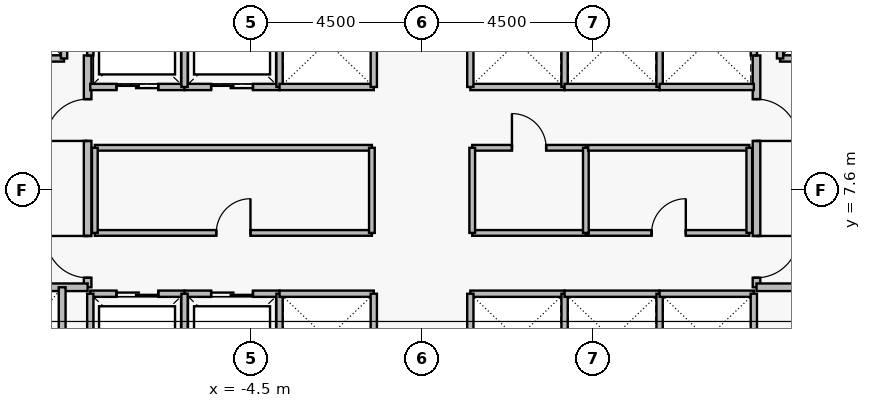
"""IFC4 building model, lengths in metres.
Left out: names, types, materials, properties, quantities, classifications, styles, units other than length and angle.
Written with IfcOpenShell. Run it as: python <this file> out.ifc"""

import sys

from ifc_helpers import new_model, si_unit, direction, frame, frame_2d, origin, place, context, subcontext, project, spatial, rectangle, extrude, element, fill, save


model = new_model("IFC4")
c1 = context("Model", 3, precision=1e-05, world=origin(), true_north=direction((0.0, 1.0)))
c2 = subcontext(c1, "Body", "Model", "MODEL_VIEW")
j1 = project(units=[si_unit("LENGTHUNIT", "METRE"), si_unit("PLANEANGLEUNIT", "RADIAN")], contexts=[c1])
p1 = place(None, origin())
s1 = spatial("IfcSite", under=j1, at=p1, CompositionType="ELEMENT")
p2 = place(p1, origin())
s2 = spatial("IfcBuilding", under=s1, at=p2, CompositionType="ELEMENT")
p3 = place(p2, frame((0.0, 0.0, 150.4)))
s3 = spatial("IfcBuildingStorey", under=s2, at=p3, CompositionType="ELEMENT", Elevation=150.4)
p4 = place(p3, frame((-8.8, 5.05, 0.0), z_axis=(0.0, 0.0, 1.0), x_axis=(0.0, 1.0, 0.0)))
e1 = element("IfcWall", 1, at=p4, inside=s3, PredefinedType="PARTITIONING", context=c2, shape_type="SweptSolid", body=[
    extrude(rectangle(XDim=6.1, YDim=0.2, at=frame_2d((3.05, 0.0))), origin(), (0.0, 0.0, 1.0), 3.43),
])
p5 = place(p4, frame((0.25, 0.0, 0.0)))
e2 = element("IfcOpeningElement", 2, at=p5, cuts=e1, PredefinedType="OPENING", context=c2, shape_type="SweptSolid", body=[
    extrude(rectangle(XDim=1.1, YDim=2.2, at=frame_2d((0.55, 1.1))), frame((0.0, 0.11, 0.0), z_axis=(0.0, -1.0, 0.0), x_axis=(1.0, 0.0, 0.0)), (0.0, 0.0, 1.0), 0.22),
])
p6 = place(p4, frame((3.85, 0.0, 0.0)))
e3 = element("IfcOpeningElement", 3, at=p6, cuts=e1, PredefinedType="OPENING", context=c2, shape_type="SweptSolid", body=[
    extrude(rectangle(XDim=1.1, YDim=2.2, at=frame_2d((0.55, 1.1))), frame((0.0, 0.11, 0.0), z_axis=(0.0, -1.0, 0.0), x_axis=(1.0, 0.0, 0.0)), (0.0, 0.0, 1.0), 0.22),
])
p7 = place(p3, frame((8.8, 11.15, 0.0), z_axis=(0.0, 0.0, 1.0), x_axis=(0.0, -1.0, 0.0)))
e4 = element("IfcWall", 4, at=p7, inside=s3, PredefinedType="PARTITIONING", context=c2, shape_type="SweptSolid", body=[
    extrude(rectangle(XDim=6.1, YDim=0.2, at=frame_2d((3.05, 0.0))), origin(), (0.0, 0.0, 1.0), 3.43),
])
p8 = place(p7, frame((1.15, 0.0, 0.0)))
e5 = element("IfcOpeningElement", 5, at=p8, cuts=e4, PredefinedType="OPENING", context=c2, shape_type="SweptSolid", body=[
    extrude(rectangle(XDim=1.1, YDim=2.2, at=frame_2d((0.55, 1.1))), frame((0.0, 0.11, 0.0), z_axis=(0.0, -1.0, 0.0), x_axis=(1.0, 0.0, 0.0)), (0.0, 0.0, 1.0), 0.22),
])
p9 = place(p7, frame((4.75, 0.0, 0.0)))
e6 = element("IfcOpeningElement", 6, at=p9, cuts=e4, PredefinedType="OPENING", context=c2, shape_type="SweptSolid", body=[
    extrude(rectangle(XDim=1.1, YDim=2.2, at=frame_2d((0.55, 1.1))), frame((0.0, 0.11, 0.0), z_axis=(0.0, -1.0, 0.0), x_axis=(1.0, 0.0, 0.0)), (0.0, 0.0, 1.0), 0.22),
])
p10 = place(p3, frame((-11.58, 11.07, 0.0), z_axis=(0.0, 0.0, 1.0), x_axis=(1.0, 0.0, 0.0)))
e7 = element("IfcWall", 7, at=p10, inside=s3, PredefinedType="PARTITIONING", context=c2, shape_type="SweptSolid", body=[
    extrude(rectangle(XDim=2.16, YDim=0.165, at=frame_2d((1.08, 0.0))), origin(), (0.0, 0.0, 1.0), 3.43),
])
p11 = place(p10, frame((0.53, 0.0, 0.0)))
e8 = element("IfcOpeningElement", 8, at=p11, cuts=e7, PredefinedType="OPENING", context=c2, shape_type="SweptSolid", body=[
    extrude(rectangle(XDim=1.15, YDim=2.25, at=frame_2d((0.575, 1.125))), frame((0.0, 0.093, 0.0), z_axis=(0.0, -1.0, 0.0), x_axis=(1.0, 0.0, 0.0)), (0.0, 0.0, 1.0), 0.185),
])
p12 = place(p3, frame((9.42, 11.07, 0.0), z_axis=(0.0, 0.0, 1.0), x_axis=(1.0, 0.0, 0.0)))
e9 = element("IfcWall", 9, at=p12, inside=s3, PredefinedType="PARTITIONING", context=c2, shape_type="SweptSolid", body=[
    extrude(rectangle(XDim=2.16, YDim=0.165, at=frame_2d((1.08, 0.0))), origin(), (0.0, 0.0, 1.0), 3.43),
])
p13 = place(p12, frame((0.53, 0.0, 0.0)))
e10 = element("IfcOpeningElement", 10, at=p13, cuts=e9, PredefinedType="OPENING", context=c2, shape_type="SweptSolid", body=[
    extrude(rectangle(XDim=1.15, YDim=2.25, at=frame_2d((0.575, 1.125))), frame((0.0, 0.093, 0.0), z_axis=(0.0, -1.0, 0.0), x_axis=(1.0, 0.0, 0.0)), (0.0, 0.0, 1.0), 0.185),
])
p14 = place(p3, frame((-8.73, 4.88, 0.0), z_axis=(0.0, 0.0, 1.0), x_axis=(1.0, 0.0, 0.0)))
e11 = element("IfcWall", 11, at=p14, inside=s3, PredefinedType="PARTITIONING", context=c2, shape_type="SweptSolid", body=[
    extrude(rectangle(XDim=2.48, YDim=0.165, at=frame_2d((1.24, 0.0))), origin(), (0.0, 0.0, 1.0), 3.43),
])
p15 = place(p14, frame((0.69, 0.0, 0.0)))
e12 = element("IfcOpeningElement", 12, at=p15, cuts=e11, PredefinedType="OPENING", context=c2, shape_type="SweptSolid", body=[
    extrude(rectangle(XDim=1.1, YDim=2.25, at=frame_2d((0.55, 1.125))), frame((0.0, 0.093, 0.0), z_axis=(0.0, -1.0, 0.0), x_axis=(1.0, 0.0, 0.0)), (0.0, 0.0, 1.0), 0.185),
])
p16 = place(p3, frame((-6.25, 4.88, 0.0), z_axis=(0.0, 0.0, 1.0), x_axis=(1.0, 0.0, 0.0)))
e13 = element("IfcWall", 13, at=p16, inside=s3, PredefinedType="PARTITIONING", context=c2, shape_type="SweptSolid", body=[
    extrude(rectangle(XDim=2.5, YDim=0.165, at=frame_2d((1.25, 0.0))), origin(), (0.0, 0.0, 1.0), 3.43),
])
p17 = place(p16, frame((0.7, 0.0, 0.0)))
e14 = element("IfcOpeningElement", 14, at=p17, cuts=e13, PredefinedType="OPENING", context=c2, shape_type="SweptSolid", body=[
    extrude(rectangle(XDim=1.1, YDim=2.25, at=frame_2d((0.55, 1.125))), frame((0.0, 0.093, 0.0), z_axis=(0.0, -1.0, 0.0), x_axis=(1.0, 0.0, 0.0)), (0.0, 0.0, 1.0), 0.185),
])
p18 = place(p3, frame((-8.73, 10.32, 0.0), z_axis=(0.0, 0.0, 1.0), x_axis=(1.0, 0.0, 0.0)))
e15 = element("IfcWall", 15, at=p18, inside=s3, PredefinedType="PARTITIONING", context=c2, shape_type="SweptSolid", body=[
    extrude(rectangle(XDim=2.48, YDim=0.165, at=frame_2d((1.24, 0.0))), origin(), (0.0, 0.0, 1.0), 3.43),
])
p19 = place(p18, frame((0.69, 0.0, 0.0)))
e16 = element("IfcOpeningElement", 16, at=p19, cuts=e15, PredefinedType="OPENING", context=c2, shape_type="SweptSolid", body=[
    extrude(rectangle(XDim=1.1, YDim=2.25, at=frame_2d((0.55, 1.125))), frame((0.0, 0.093, 0.0), z_axis=(0.0, -1.0, 0.0), x_axis=(1.0, 0.0, 0.0)), (0.0, 0.0, 1.0), 0.185),
])
p20 = place(p3, frame((-6.25, 10.32, 0.0), z_axis=(0.0, 0.0, 1.0), x_axis=(1.0, 0.0, 0.0)))
e17 = element("IfcWall", 17, at=p20, inside=s3, PredefinedType="PARTITIONING", context=c2, shape_type="SweptSolid", body=[
    extrude(rectangle(XDim=2.5, YDim=0.165, at=frame_2d((1.25, 0.0))), origin(), (0.0, 0.0, 1.0), 3.43),
])
p21 = place(p20, frame((0.7, 0.0, 0.0)))
e18 = element("IfcOpeningElement", 18, at=p21, cuts=e17, PredefinedType="OPENING", context=c2, shape_type="SweptSolid", body=[
    extrude(rectangle(XDim=1.1, YDim=2.25, at=frame_2d((0.55, 1.125))), frame((0.0, 0.093, 0.0), z_axis=(0.0, -1.0, 0.0), x_axis=(1.0, 0.0, 0.0)), (0.0, 0.0, 1.0), 0.185),
])
p22 = place(p3, frame((-8.61, 6.48, 0.0), z_axis=(0.0, 0.0, 1.0), x_axis=(1.0, 0.0, 0.0)))
e19 = element("IfcWall", 19, at=p22, inside=s3, PredefinedType="PARTITIONING", context=c2, shape_type="SweptSolid", body=[
    extrude(rectangle(XDim=7.29, YDim=0.15, at=frame_2d((3.645, 0.0))), origin(), (0.0, 0.0, 1.0), 3.43),
])
p23 = place(p22, frame((3.195, 0.0, 0.0)))
e20 = element("IfcOpeningElement", 20, at=p23, cuts=e19, PredefinedType="OPENING", context=c2, shape_type="SweptSolid", body=[
    extrude(rectangle(XDim=0.9, YDim=2.15, at=frame_2d((0.45, 1.075))), frame((0.0, 0.085, 0.0), z_axis=(0.0, -1.0, 0.0), x_axis=(1.0, 0.0, 0.0)), (0.0, 0.0, 1.0), 0.17),
])
p24 = place(p3, frame((1.32, 8.72, 0.0), z_axis=(0.0, 0.0, 1.0), x_axis=(1.0, 0.0, 0.0)))
e21 = element("IfcWall", 21, at=p24, inside=s3, PredefinedType="PARTITIONING", context=c2, shape_type="SweptSolid", body=[
    extrude(rectangle(XDim=2.99, YDim=0.15, at=frame_2d((1.495, 0.0))), origin(), (0.0, 0.0, 1.0), 3.43),
])
p25 = place(p24, frame((1.045, 0.0, 0.0)))
e22 = element("IfcOpeningElement", 22, at=p25, cuts=e21, PredefinedType="OPENING", context=c2, shape_type="SweptSolid", body=[
    extrude(rectangle(XDim=0.9, YDim=2.15, at=frame_2d((0.45, 1.075))), frame((0.0, 0.085, 0.0), z_axis=(0.0, -1.0, 0.0), x_axis=(1.0, 0.0, 0.0)), (0.0, 0.0, 1.0), 0.17),
])
p26 = place(p3, frame((4.37, 6.48, 0.0), z_axis=(0.0, 0.0, 1.0), x_axis=(1.0, 0.0, 0.0)))
e23 = element("IfcWall", 23, at=p26, inside=s3, PredefinedType="PARTITIONING", context=c2, shape_type="SweptSolid", body=[
    extrude(rectangle(XDim=4.24, YDim=0.15, at=frame_2d((2.12, 0.0))), origin(), (0.0, 0.0, 1.0), 3.43),
])
p27 = place(p26, frame((1.67, 0.0, 0.0)))
e24 = element("IfcOpeningElement", 24, at=p27, cuts=e23, PredefinedType="OPENING", context=c2, shape_type="SweptSolid", body=[
    extrude(rectangle(XDim=0.9, YDim=2.15, at=frame_2d((0.45, 1.075))), frame((0.0, 0.085, 0.0), z_axis=(0.0, -1.0, 0.0), x_axis=(1.0, 0.0, 0.0)), (0.0, 0.0, 1.0), 0.17),
])
for number, where, z_axis, x_axis in (
    (25, (-11.65, 5.05, 0.0), (0.0, 0.0, 1.0), (1.0, 0.0, 0.0)),
    (26, (8.8, 5.05, 0.0), (0.0, 0.0, 1.0), (1.0, 0.0, 0.0)),
):
    element("IfcWall", number, at=place(p3, frame(where, z_axis=z_axis, x_axis=x_axis)), inside=s3, PredefinedType="PARTITIONING", context=c2, shape_type="SweptSolid", body=[
        extrude(rectangle(XDim=2.85, YDim=0.2, at=frame_2d((1.425, 0.0))), origin(), (0.0, 0.0, 1.0), 3.43),
    ])
for number, where, z_axis, x_axis in (
    (27, (-9.42, 11.07, 0.0), (0.0, 0.0, 1.0), (0.0, 1.0, 0.0)),
    (28, (9.42, 11.07, 0.0), (0.0, 0.0, 1.0), (0.0, 1.0, 0.0)),
):
    element("IfcWall", number, at=place(p3, frame(where, z_axis=z_axis, x_axis=x_axis)), inside=s3, PredefinedType="PARTITIONING", context=c2, shape_type="SweptSolid", body=[
        extrude(rectangle(XDim=2.96, YDim=0.165, at=frame_2d((1.48, 0.0))), origin(), (0.0, 0.0, 1.0), 3.43),
    ])
for number, where, z_axis, x_axis in (
    (29, (-8.73, 2.52, 0.0), (0.0, 0.0, 1.0), (0.0, 1.0, 0.0)),
    (30, (-6.25, 2.52, 0.0), (0.0, 0.0, 1.0), (0.0, 1.0, 0.0)),
    (31, (-3.75, 2.52, 0.0), (0.0, 0.0, 1.0), (0.0, 1.0, 0.0)),
):
    element("IfcWall", number, at=place(p3, frame(where, z_axis=z_axis, x_axis=x_axis)), inside=s3, PredefinedType="PARTITIONING", context=c2, shape_type="SweptSolid", body=[
        extrude(rectangle(XDim=2.36, YDim=0.165, at=frame_2d((1.18, 0.0))), origin(), (0.0, 0.0, 1.0), 3.43),
    ])
p28 = place(p3, frame((-8.73, 11.15, 0.0), z_axis=(0.0, 0.0, 1.0), x_axis=(0.0, 1.0, 0.0)))
e32 = element("IfcWall", 32, at=p28, inside=s3, PredefinedType="PARTITIONING", context=c2, shape_type="SweptSolid", body=[
    extrude(rectangle(XDim=1.53, YDim=0.165, at=frame_2d((0.765, 0.0))), origin(), (0.0, 0.0, 1.0), 3.43),
])
for number, where, z_axis, x_axis in (
    (33, (-6.25, 10.32, 0.0), (0.0, 0.0, 1.0), (0.0, 1.0, 0.0)),
    (34, (-3.75, 10.32, 0.0), (0.0, 0.0, 1.0), (0.0, 1.0, 0.0)),
):
    element("IfcWall", number, at=place(p3, frame(where, z_axis=z_axis, x_axis=x_axis)), inside=s3, PredefinedType="PARTITIONING", context=c2, shape_type="SweptSolid", body=[
        extrude(rectangle(XDim=2.36, YDim=0.165, at=frame_2d((1.18, 0.0))), origin(), (0.0, 0.0, 1.0), 3.43),
    ])
p29 = place(p3, frame((-3.75, 4.88, 0.0), z_axis=(0.0, 0.0, 1.0), x_axis=(1.0, 0.0, 0.0)))
e35 = element("IfcWall", 35, at=p29, inside=s3, PredefinedType="PARTITIONING", context=c2, shape_type="SweptSolid", body=[
    extrude(rectangle(XDim=2.48, YDim=0.165, at=frame_2d((1.24, 0.0))), origin(), (0.0, 0.0, 1.0), 3.43),
])
p30 = place(p3, frame((-1.27, 2.52, 0.0), z_axis=(0.0, 0.0, 1.0), x_axis=(0.0, 1.0, 0.0)))
e36 = element("IfcWall", 36, at=p30, inside=s3, PredefinedType="PARTITIONING", context=c2, shape_type="SweptSolid", body=[
    extrude(rectangle(XDim=2.36, YDim=0.165, at=frame_2d((1.18, 0.0))), origin(), (0.0, 0.0, 1.0), 3.43),
])
p31 = place(p3, frame((1.27, 4.88, 0.0), z_axis=(0.0, 0.0, 1.0), x_axis=(1.0, 0.0, 0.0)))
e37 = element("IfcWall", 37, at=p31, inside=s3, PredefinedType="PARTITIONING", context=c2, shape_type="SweptSolid", body=[
    extrude(rectangle(XDim=2.48, YDim=0.165, at=frame_2d((1.24, 0.0))), origin(), (0.0, 0.0, 1.0), 3.43),
])
for number, where, z_axis, x_axis in (
    (38, (1.27, 2.52, 0.0), (0.0, 0.0, 1.0), (0.0, 1.0, 0.0)),
    (39, (3.75, 2.52, 0.0), (0.0, 0.0, 1.0), (0.0, 1.0, 0.0)),
):
    element("IfcWall", number, at=place(p3, frame(where, z_axis=z_axis, x_axis=x_axis)), inside=s3, PredefinedType="PARTITIONING", context=c2, shape_type="SweptSolid", body=[
        extrude(rectangle(XDim=2.36, YDim=0.165, at=frame_2d((1.18, 0.0))), origin(), (0.0, 0.0, 1.0), 3.43),
    ])
p32 = place(p3, frame((-3.75, 10.32, 0.0), z_axis=(0.0, 0.0, 1.0), x_axis=(1.0, 0.0, 0.0)))
e40 = element("IfcWall", 40, at=p32, inside=s3, PredefinedType="PARTITIONING", context=c2, shape_type="SweptSolid", body=[
    extrude(rectangle(XDim=2.48, YDim=0.165, at=frame_2d((1.24, 0.0))), origin(), (0.0, 0.0, 1.0), 3.43),
])
p33 = place(p3, frame((-1.27, 10.32, 0.0), z_axis=(0.0, 0.0, 1.0), x_axis=(0.0, 1.0, 0.0)))
e41 = element("IfcWall", 41, at=p33, inside=s3, PredefinedType="PARTITIONING", context=c2, shape_type="SweptSolid", body=[
    extrude(rectangle(XDim=2.36, YDim=0.165, at=frame_2d((1.18, 0.0))), origin(), (0.0, 0.0, 1.0), 3.43),
])
p34 = place(p3, frame((1.27, 10.32, 0.0), z_axis=(0.0, 0.0, 1.0), x_axis=(1.0, 0.0, 0.0)))
e42 = element("IfcWall", 42, at=p34, inside=s3, PredefinedType="PARTITIONING", context=c2, shape_type="SweptSolid", body=[
    extrude(rectangle(XDim=2.48, YDim=0.165, at=frame_2d((1.24, 0.0))), origin(), (0.0, 0.0, 1.0), 3.43),
])
for number, where, z_axis, x_axis in (
    (43, (1.27, 10.32, 0.0), (0.0, 0.0, 1.0), (0.0, 1.0, 0.0)),
    (44, (3.75, 10.32, 0.0), (0.0, 0.0, 1.0), (0.0, 1.0, 0.0)),
):
    element("IfcWall", number, at=place(p3, frame(where, z_axis=z_axis, x_axis=x_axis)), inside=s3, PredefinedType="PARTITIONING", context=c2, shape_type="SweptSolid", body=[
        extrude(rectangle(XDim=2.36, YDim=0.165, at=frame_2d((1.18, 0.0))), origin(), (0.0, 0.0, 1.0), 3.43),
    ])
p35 = place(p3, frame((3.75, 4.88, 0.0), z_axis=(0.0, 0.0, 1.0), x_axis=(1.0, 0.0, 0.0)))
e45 = element("IfcWall", 45, at=p35, inside=s3, PredefinedType="PARTITIONING", context=c2, shape_type="SweptSolid", body=[
    extrude(rectangle(XDim=2.5, YDim=0.165, at=frame_2d((1.25, 0.0))), origin(), (0.0, 0.0, 1.0), 3.43),
])
p36 = place(p3, frame((6.25, 2.52, 0.0), z_axis=(0.0, 0.0, 1.0), x_axis=(0.0, 1.0, 0.0)))
e46 = element("IfcWall", 46, at=p36, inside=s3, PredefinedType="PARTITIONING", context=c2, shape_type="SweptSolid", body=[
    extrude(rectangle(XDim=2.36, YDim=0.165, at=frame_2d((1.18, 0.0))), origin(), (0.0, 0.0, 1.0), 3.43),
])
p37 = place(p3, frame((6.25, 4.88, 0.0), z_axis=(0.0, 0.0, 1.0), x_axis=(1.0, 0.0, 0.0)))
e47 = element("IfcWall", 47, at=p37, inside=s3, PredefinedType="PARTITIONING", context=c2, shape_type="SweptSolid", body=[
    extrude(rectangle(XDim=2.48, YDim=0.165, at=frame_2d((1.24, 0.0))), origin(), (0.0, 0.0, 1.0), 3.43),
])
p38 = place(p3, frame((8.73, 2.52, 0.0), z_axis=(0.0, 0.0, 1.0), x_axis=(0.0, 1.0, 0.0)))
e48 = element("IfcWall", 48, at=p38, inside=s3, PredefinedType="PARTITIONING", context=c2, shape_type="SweptSolid", body=[
    extrude(rectangle(XDim=2.36, YDim=0.165, at=frame_2d((1.18, 0.0))), origin(), (0.0, 0.0, 1.0), 3.43),
])
p39 = place(p3, frame((3.75, 10.32, 0.0), z_axis=(0.0, 0.0, 1.0), x_axis=(1.0, 0.0, 0.0)))
e49 = element("IfcWall", 49, at=p39, inside=s3, PredefinedType="PARTITIONING", context=c2, shape_type="SweptSolid", body=[
    extrude(rectangle(XDim=2.5, YDim=0.165, at=frame_2d((1.25, 0.0))), origin(), (0.0, 0.0, 1.0), 3.43),
])
p40 = place(p3, frame((6.25, 10.32, 0.0), z_axis=(0.0, 0.0, 1.0), x_axis=(0.0, 1.0, 0.0)))
e50 = element("IfcWall", 50, at=p40, inside=s3, PredefinedType="PARTITIONING", context=c2, shape_type="SweptSolid", body=[
    extrude(rectangle(XDim=2.36, YDim=0.165, at=frame_2d((1.18, 0.0))), origin(), (0.0, 0.0, 1.0), 3.43),
])
p41 = place(p3, frame((6.25, 10.32, 0.0), z_axis=(0.0, 0.0, 1.0), x_axis=(1.0, 0.0, 0.0)))
e51 = element("IfcWall", 51, at=p41, inside=s3, PredefinedType="PARTITIONING", context=c2, shape_type="SweptSolid", body=[
    extrude(rectangle(XDim=2.48, YDim=0.165, at=frame_2d((1.24, 0.0))), origin(), (0.0, 0.0, 1.0), 3.43),
])
p42 = place(p3, frame((8.73, 11.15, 0.0), z_axis=(0.0, 0.0, 1.0), x_axis=(0.0, 1.0, 0.0)))
e52 = element("IfcWall", 52, at=p42, inside=s3, PredefinedType="PARTITIONING", context=c2, shape_type="SweptSolid", body=[
    extrude(rectangle(XDim=1.53, YDim=0.165, at=frame_2d((0.765, 0.0))), origin(), (0.0, 0.0, 1.0), 3.43),
])
p43 = place(p3, frame((-9.47, 2.45, 0.0), z_axis=(0.0, 0.0, 1.0), x_axis=(0.0, 1.0, 0.0)))
e53 = element("IfcWall", 53, at=p43, inside=s3, PredefinedType="PARTITIONING", context=c2, shape_type="SweptSolid", body=[
    extrude(rectangle(XDim=2.6, YDim=0.18, at=frame_2d((1.3, 0.0))), origin(), (0.0, 0.0, 1.0), 3.43),
])
p44 = place(p3, frame((-8.61, 8.72, 0.0), z_axis=(0.0, 0.0, 1.0), x_axis=(1.0, 0.0, 0.0)))
e54 = element("IfcWall", 54, at=p44, inside=s3, PredefinedType="PARTITIONING", context=c2, shape_type="SweptSolid", body=[
    extrude(rectangle(XDim=7.29, YDim=0.15, at=frame_2d((3.645, 0.0))), origin(), (0.0, 0.0, 1.0), 3.43),
])
for number, where, z_axis, x_axis in (
    (55, (-8.61, 6.48, 0.0), (0.0, 0.0, 1.0), (0.0, 1.0, 0.0)),
    (56, (-1.32, 6.48, 0.0), (0.0, 0.0, 1.0), (0.0, 1.0, 0.0)),
):
    element("IfcWall", number, at=place(p3, frame(where, z_axis=z_axis, x_axis=x_axis)), inside=s3, PredefinedType="PARTITIONING", context=c2, shape_type="SweptSolid", body=[
        extrude(rectangle(XDim=2.24, YDim=0.15, at=frame_2d((1.12, 0.0))), origin(), (0.0, 0.0, 1.0), 3.43),
    ])
p45 = place(p3, frame((1.32, 6.48, 0.0), z_axis=(0.0, 0.0, 1.0), x_axis=(1.0, 0.0, 0.0)))
e57 = element("IfcWall", 57, at=p45, inside=s3, PredefinedType="PARTITIONING", context=c2, shape_type="SweptSolid", body=[
    extrude(rectangle(XDim=2.99, YDim=0.15, at=frame_2d((1.495, 0.0))), origin(), (0.0, 0.0, 1.0), 3.43),
])
for number, where, z_axis, x_axis in (
    (58, (1.32, 6.48, 0.0), (0.0, 0.0, 1.0), (0.0, 1.0, 0.0)),
    (59, (4.31, 6.48, 0.0), (0.0, 0.0, 1.0), (0.0, 1.0, 0.0)),
):
    element("IfcWall", number, at=place(p3, frame(where, z_axis=z_axis, x_axis=x_axis)), inside=s3, PredefinedType="PARTITIONING", context=c2, shape_type="SweptSolid", body=[
        extrude(rectangle(XDim=2.24, YDim=0.15, at=frame_2d((1.12, 0.0))), origin(), (0.0, 0.0, 1.0), 3.43),
    ])
p46 = place(p3, frame((4.37, 8.72, 0.0), z_axis=(0.0, 0.0, 1.0), x_axis=(1.0, 0.0, 0.0)))
e60 = element("IfcWall", 60, at=p46, inside=s3, PredefinedType="PARTITIONING", context=c2, shape_type="SweptSolid", body=[
    extrude(rectangle(XDim=4.24, YDim=0.15, at=frame_2d((2.12, 0.0))), origin(), (0.0, 0.0, 1.0), 3.43),
])
p47 = place(p3, frame((8.61, 6.48, 0.0), z_axis=(0.0, 0.0, 1.0), x_axis=(0.0, 1.0, 0.0)))
e61 = element("IfcWall", 61, at=p47, inside=s3, PredefinedType="PARTITIONING", context=c2, shape_type="SweptSolid", body=[
    extrude(rectangle(XDim=2.24, YDim=0.15, at=frame_2d((1.12, 0.0))), origin(), (0.0, 0.0, 1.0), 3.43),
])
p48 = place(p5, origin())
e62 = element("IfcDoor", 62, at=p48, inside=s3, OperationType="SINGLE_SWING_RIGHT", PredefinedType="DOOR", context=c2, shape_type="SweptSolid", body=[
    extrude(rectangle(XDim=1.1, YDim=2.2, at=frame_2d((0.55, 1.1))), frame((0.0, 0.025, 0.0), z_axis=(0.0, -1.0, 0.0), x_axis=(1.0, 0.0, 0.0)), (0.0, 0.0, 1.0), 0.05),
])
fill(e2, e62)
p49 = place(p6, origin())
e63 = element("IfcDoor", 63, at=p49, inside=s3, OperationType="SINGLE_SWING_LEFT", PredefinedType="DOOR", context=c2, shape_type="SweptSolid", body=[
    extrude(rectangle(XDim=1.1, YDim=2.2, at=frame_2d((0.55, 1.1))), frame((0.0, 0.025, 0.0), z_axis=(0.0, -1.0, 0.0), x_axis=(1.0, 0.0, 0.0)), (0.0, 0.0, 1.0), 0.05),
])
fill(e3, e63)
p50 = place(p8, origin())
e64 = element("IfcDoor", 64, at=p50, inside=s3, OperationType="SINGLE_SWING_RIGHT", PredefinedType="DOOR", context=c2, shape_type="SweptSolid", body=[
    extrude(rectangle(XDim=1.1, YDim=2.2, at=frame_2d((0.55, 1.1))), frame((0.0, 0.025, 0.0), z_axis=(0.0, -1.0, 0.0), x_axis=(1.0, 0.0, 0.0)), (0.0, 0.0, 1.0), 0.05),
])
fill(e5, e64)
p51 = place(p9, origin())
e65 = element("IfcDoor", 65, at=p51, inside=s3, OperationType="SINGLE_SWING_LEFT", PredefinedType="DOOR", context=c2, shape_type="SweptSolid", body=[
    extrude(rectangle(XDim=1.1, YDim=2.2, at=frame_2d((0.55, 1.1))), frame((0.0, 0.025, 0.0), z_axis=(0.0, -1.0, 0.0), x_axis=(1.0, 0.0, 0.0)), (0.0, 0.0, 1.0), 0.05),
])
fill(e6, e65)
p52 = place(p15, origin())
e66 = element("IfcDoor", 66, at=p52, inside=s3, OperationType="SLIDING_TO_LEFT", PredefinedType="DOOR", context=c2, shape_type="SweptSolid", body=[
    extrude(rectangle(XDim=1.1, YDim=2.25, at=frame_2d((0.55, 1.125))), frame((0.0, 0.025, 0.0), z_axis=(0.0, -1.0, 0.0), x_axis=(1.0, 0.0, 0.0)), (0.0, 0.0, 1.0), 0.05),
])
fill(e12, e66)
p53 = place(p17, origin())
e67 = element("IfcDoor", 67, at=p53, inside=s3, OperationType="SLIDING_TO_LEFT", PredefinedType="DOOR", context=c2, shape_type="SweptSolid", body=[
    extrude(rectangle(XDim=1.1, YDim=2.25, at=frame_2d((0.55, 1.125))), frame((0.0, 0.025, 0.0), z_axis=(0.0, -1.0, 0.0), x_axis=(1.0, 0.0, 0.0)), (0.0, 0.0, 1.0), 0.05),
])
fill(e14, e67)
p54 = place(p19, origin())
e68 = element("IfcDoor", 68, at=p54, inside=s3, OperationType="SLIDING_TO_LEFT", PredefinedType="DOOR", context=c2, shape_type="SweptSolid", body=[
    extrude(rectangle(XDim=1.1, YDim=2.25, at=frame_2d((0.55, 1.125))), frame((0.0, 0.025, 0.0), z_axis=(0.0, -1.0, 0.0), x_axis=(1.0, 0.0, 0.0)), (0.0, 0.0, 1.0), 0.05),
])
fill(e16, e68)
p55 = place(p21, origin())
e69 = element("IfcDoor", 69, at=p55, inside=s3, OperationType="SLIDING_TO_LEFT", PredefinedType="DOOR", context=c2, shape_type="SweptSolid", body=[
    extrude(rectangle(XDim=1.1, YDim=2.25, at=frame_2d((0.55, 1.125))), frame((0.0, 0.025, 0.0), z_axis=(0.0, -1.0, 0.0), x_axis=(1.0, 0.0, 0.0)), (0.0, 0.0, 1.0), 0.05),
])
fill(e18, e69)
p56 = place(p23, origin())
e70 = element("IfcDoor", 70, at=p56, inside=s3, OperationType="SINGLE_SWING_RIGHT", PredefinedType="DOOR", context=c2, shape_type="SweptSolid", body=[
    extrude(rectangle(XDim=0.9, YDim=2.15, at=frame_2d((0.45, 1.075))), frame((0.0, 0.025, 0.0), z_axis=(0.0, -1.0, 0.0), x_axis=(1.0, 0.0, 0.0)), (0.0, 0.0, 1.0), 0.05),
])
fill(e20, e70)
p57 = place(p25, origin())
e71 = element("IfcDoor", 71, at=p57, inside=s3, OperationType="SINGLE_SWING_LEFT", PredefinedType="DOOR", context=c2, shape_type="SweptSolid", body=[
    extrude(rectangle(XDim=0.9, YDim=2.15, at=frame_2d((0.45, 1.075))), frame((0.0, 0.025, 0.0), z_axis=(0.0, -1.0, 0.0), x_axis=(1.0, 0.0, 0.0)), (0.0, 0.0, 1.0), 0.05),
])
fill(e22, e71)
p58 = place(p27, origin())
e72 = element("IfcDoor", 72, at=p58, inside=s3, OperationType="SINGLE_SWING_RIGHT", PredefinedType="DOOR", context=c2, shape_type="SweptSolid", body=[
    extrude(rectangle(XDim=0.9, YDim=2.15, at=frame_2d((0.45, 1.075))), frame((0.0, 0.025, 0.0), z_axis=(0.0, -1.0, 0.0), x_axis=(1.0, 0.0, 0.0)), (0.0, 0.0, 1.0), 0.05),
])
fill(e24, e72)
save(model, sys.argv[1])
